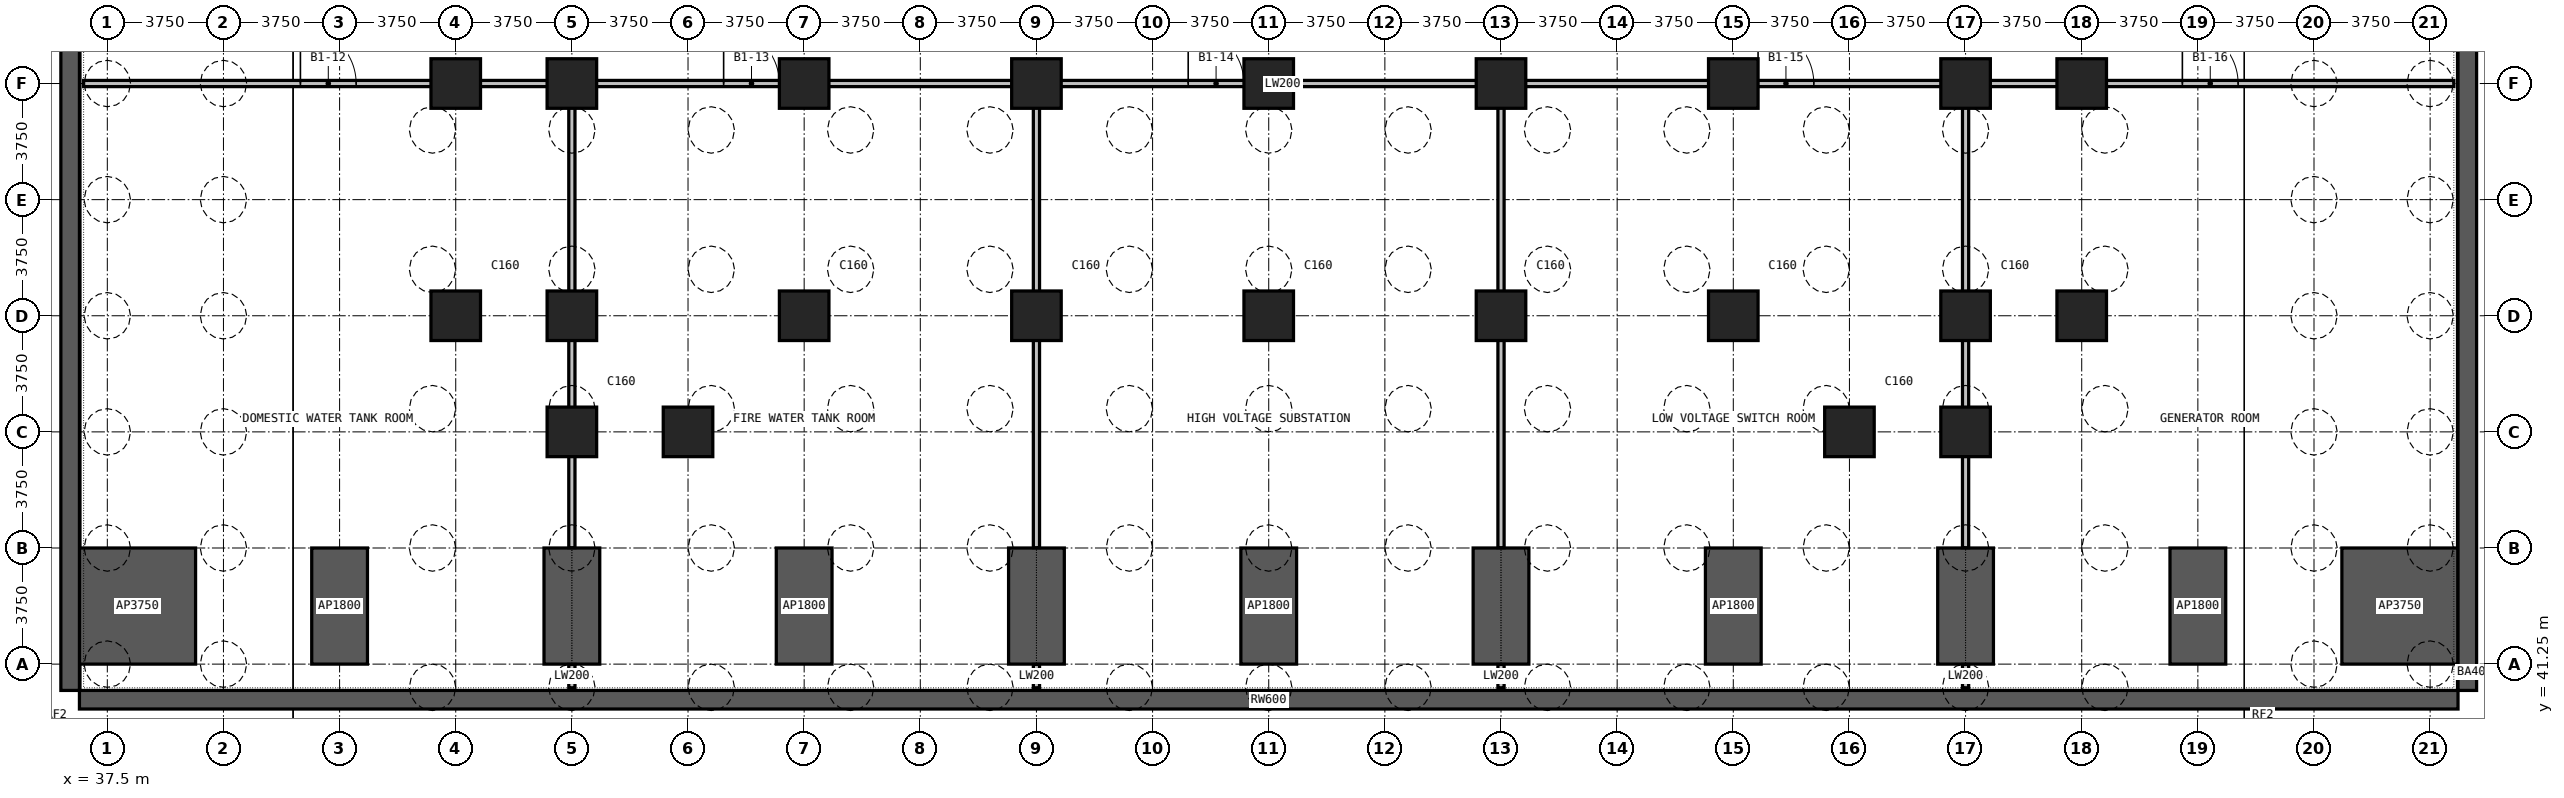
"""IFC4 building model, lengths in metres.
Left out: names, types, materials, properties, quantities, classifications, styles, units other than length and angle.
Written with IfcOpenShell. Run it as: python <this file> out.ifc"""

import sys

from ifc_helpers import new_model, si_unit, direction, frame, frame_2d, origin, origin_2d, place, context, subcontext, project, spatial, rectangle, extrude, element, fill, save


model = new_model("IFC4")
c1 = context("Model", 3, precision=1e-05, world=origin(), true_north=direction((0.0, 1.0)))
c2 = subcontext(c1, "Body", "Model", "MODEL_VIEW")
j1 = project(units=[si_unit("LENGTHUNIT", "METRE"), si_unit("PLANEANGLEUNIT", "RADIAN")], contexts=[c1])
p1 = place(None, origin())
s1 = spatial("IfcSite", under=j1, at=p1, CompositionType="ELEMENT")
p2 = place(p1, origin())
s2 = spatial("IfcBuilding", under=s1, at=p2, CompositionType="ELEMENT")
p3 = place(p2, frame((0.0, 0.0, -6.0)))
s3 = spatial("IfcBuildingStorey", under=s2, at=p3, CompositionType="ELEMENT", Elevation=-6.0)
p4 = place(p3, frame((38.475, 41.25, 0.0), z_axis=(0.0, 0.0, 1.0), x_axis=(0.0, 1.0, 0.0)))
e1 = element("IfcWall", 1, at=p4, inside=s3, PredefinedType="SHEAR", context=c2, shape_type="SweptSolid", body=[
    extrude(rectangle(XDim=3.75, YDim=3.75, at=frame_2d((1.875, 0.0))), origin(), (0.0, 0.0, 1.0), 6.0),
])
for number, where, z_axis, x_axis in (
    (2, (45.0, 41.25, 0.0), (0.0, 0.0, 1.0), (0.0, 1.0, 0.0)),
    (3, (52.5, 41.25, 0.0), (0.0, 0.0, 1.0), (0.0, 1.0, 0.0)),
    (4, (60.0, 41.25, 0.0), (0.0, 0.0, 1.0), (0.0, 1.0, 0.0)),
    (5, (67.5, 41.25, 0.0), (0.0, 0.0, 1.0), (0.0, 1.0, 0.0)),
    (6, (75.0, 41.25, 0.0), (0.0, 0.0, 1.0), (0.0, 1.0, 0.0)),
    (7, (82.5, 41.25, 0.0), (0.0, 0.0, 1.0), (0.0, 1.0, 0.0)),
    (8, (90.0, 41.25, 0.0), (0.0, 0.0, 1.0), (0.0, 1.0, 0.0)),
    (9, (97.5, 41.25, 0.0), (0.0, 0.0, 1.0), (0.0, 1.0, 0.0)),
    (10, (105.0, 41.25, 0.0), (0.0, 0.0, 1.0), (0.0, 1.0, 0.0)),
):
    element("IfcWall", number, at=place(p3, frame(where, z_axis=z_axis, x_axis=x_axis)), inside=s3, PredefinedType="SHEAR", context=c2, shape_type="SweptSolid", body=[
        extrude(rectangle(XDim=3.75, YDim=1.8, at=frame_2d((1.875, 0.0))), origin(), (0.0, 0.0, 1.0), 6.0),
    ])
p5 = place(p3, frame((111.525, 41.25, 0.0), z_axis=(0.0, 0.0, 1.0), x_axis=(0.0, 1.0, 0.0)))
e11 = element("IfcWall", 11, at=p5, inside=s3, PredefinedType="SHEAR", context=c2, shape_type="SweptSolid", body=[
    extrude(rectangle(XDim=3.75, YDim=3.75, at=frame_2d((1.875, 0.0))), origin(), (0.0, 0.0, 1.0), 6.0),
])
for number, where, z_axis, x_axis in (
    (12, (113.7, 40.4, -0.4), (0.0, 0.0, 1.0), (0.0, 1.0, 0.0)),
    (13, (36.3, 40.4, -0.4), (0.0, 0.0, 1.0), (0.0, 1.0, 0.0)),
):
    element("IfcWall", number, at=place(p3, frame(where, z_axis=z_axis, x_axis=x_axis)), inside=s3, PredefinedType="SOLIDWALL", context=c2, shape_type="SweptSolid", body=[
        extrude(rectangle(XDim=54.8, YDim=0.6, at=frame_2d((27.4, 0.0))), origin(), (0.0, 0.0, 1.0), 6.4),
    ])
p6 = place(p3, frame((36.6, 40.1, -0.4), z_axis=(0.0, 0.0, 1.0), x_axis=(1.0, 0.0, 0.0)))
e14 = element("IfcWall", 14, at=p6, inside=s3, PredefinedType="SOLIDWALL", context=c2, shape_type="SweptSolid", body=[
    extrude(rectangle(XDim=76.8, YDim=0.6, at=frame_2d((38.4, 0.0))), origin(), (0.0, 0.0, 1.0), 6.4),
])
for number, where, z_axis, x_axis in (
    (15, (48.75, 52.5, 0.0), (0.0, 0.0, 1.0), (1.0, 0.0, 0.0)),
    (16, (48.75, 60.0, 0.0), (0.0, 0.0, 1.0), (1.0, 0.0, 0.0)),
    (17, (52.5, 48.75, 0.0), (0.0, 0.0, 1.0), (1.0, 0.0, 0.0)),
    (18, (52.5, 52.5, 0.0), (0.0, 0.0, 1.0), (1.0, 0.0, 0.0)),
    (19, (52.5, 60.0, 0.0), (0.0, 0.0, 1.0), (1.0, 0.0, 0.0)),
    (20, (56.25, 48.75, 0.0), (0.0, 0.0, 1.0), (1.0, 0.0, 0.0)),
    (21, (60.0, 52.5, 0.0), (0.0, 0.0, 1.0), (1.0, 0.0, 0.0)),
    (22, (60.0, 60.0, 0.0), (0.0, 0.0, 1.0), (1.0, 0.0, 0.0)),
    (23, (67.5, 52.5, 0.0), (0.0, 0.0, 1.0), (1.0, 0.0, 0.0)),
    (24, (67.5, 60.0, 0.0), (0.0, 0.0, 1.0), (1.0, 0.0, 0.0)),
    (25, (75.0, 52.5, 0.0), (0.0, 0.0, 1.0), (1.0, 0.0, 0.0)),
    (26, (75.0, 60.0, 0.0), (0.0, 0.0, 1.0), (1.0, 0.0, 0.0)),
    (27, (82.5, 52.5, 0.0), (0.0, 0.0, 1.0), (1.0, 0.0, 0.0)),
    (28, (82.5, 60.0, 0.0), (0.0, 0.0, 1.0), (1.0, 0.0, 0.0)),
    (29, (90.0, 52.5, 0.0), (0.0, 0.0, 1.0), (1.0, 0.0, 0.0)),
    (30, (90.0, 60.0, 0.0), (0.0, 0.0, 1.0), (1.0, 0.0, 0.0)),
    (31, (93.75, 48.75, 0.0), (0.0, 0.0, 1.0), (1.0, 0.0, 0.0)),
    (32, (97.5, 48.75, 0.0), (0.0, 0.0, 1.0), (1.0, 0.0, 0.0)),
    (33, (97.5, 52.5, 0.0), (0.0, 0.0, 1.0), (1.0, 0.0, 0.0)),
    (34, (97.5, 60.0, 0.0), (0.0, 0.0, 1.0), (1.0, 0.0, 0.0)),
    (35, (101.25, 52.5, 0.0), (0.0, 0.0, 1.0), (1.0, 0.0, 0.0)),
    (36, (101.25, 60.0, 0.0), (0.0, 0.0, 1.0), (1.0, 0.0, 0.0)),
):
    element("IfcColumn", number, at=place(p3, frame(where, z_axis=z_axis, x_axis=x_axis)), inside=s3, PredefinedType="COLUMN", context=c2, shape_type="SweptSolid", body=[
        extrude(rectangle(XDim=1.6, YDim=1.6, at=origin_2d()), origin(), (0.0, 0.0, 1.0), 6.0),
    ])
p7 = place(p3, frame((36.735, 60.0, 0.0), z_axis=(0.0, 0.0, 1.0), x_axis=(1.0, 0.0, 0.0)))
e37 = element("IfcWall", 37, at=p7, inside=s3, PredefinedType="PARTITIONING", context=c2, shape_type="SweptSolid", body=[
    extrude(rectangle(XDim=76.53, YDim=0.2, at=frame_2d((38.265, 0.0))), origin(), (0.0, 0.0, 1.0), 5.65),
])
p8 = place(p7, frame((7.0, 0.0, 0.0)))
e38 = element("IfcOpeningElement", 38, at=p8, cuts=e37, PredefinedType="OPENING", context=c2, shape_type="SweptSolid", body=[
    extrude(rectangle(XDim=1.8, YDim=2.4, at=frame_2d((0.9, 1.2))), frame((0.0, 0.11, 0.0), z_axis=(0.0, -1.0, 0.0), x_axis=(1.0, 0.0, 0.0)), (0.0, 0.0, 1.0), 0.22),
])
p9 = place(p7, frame((20.665, 0.0, 0.0)))
e39 = element("IfcOpeningElement", 39, at=p9, cuts=e37, PredefinedType="OPENING", context=c2, shape_type="SweptSolid", body=[
    extrude(rectangle(XDim=1.8, YDim=2.4, at=frame_2d((0.9, 1.2))), frame((0.0, 0.11, 0.0), z_axis=(0.0, -1.0, 0.0), x_axis=(1.0, 0.0, 0.0)), (0.0, 0.0, 1.0), 0.22),
])
p10 = place(p7, frame((35.665, 0.0, 0.0)))
e40 = element("IfcOpeningElement", 40, at=p10, cuts=e37, PredefinedType="OPENING", context=c2, shape_type="SweptSolid", body=[
    extrude(rectangle(XDim=1.8, YDim=2.4, at=frame_2d((0.9, 1.2))), frame((0.0, 0.11, 0.0), z_axis=(0.0, -1.0, 0.0), x_axis=(1.0, 0.0, 0.0)), (0.0, 0.0, 1.0), 0.22),
])
p11 = place(p7, frame((54.065, 0.0, 0.0)))
e41 = element("IfcOpeningElement", 41, at=p11, cuts=e37, PredefinedType="OPENING", context=c2, shape_type="SweptSolid", body=[
    extrude(rectangle(XDim=1.8, YDim=2.4, at=frame_2d((0.9, 1.2))), frame((0.0, 0.11, 0.0), z_axis=(0.0, -1.0, 0.0), x_axis=(1.0, 0.0, 0.0)), (0.0, 0.0, 1.0), 0.22),
])
p12 = place(p7, frame((67.765, 0.0, 0.0)))
e42 = element("IfcOpeningElement", 42, at=p12, cuts=e37, PredefinedType="OPENING", context=c2, shape_type="SweptSolid", body=[
    extrude(rectangle(XDim=1.8, YDim=2.4, at=frame_2d((0.9, 1.2))), frame((0.0, 0.11, 0.0), z_axis=(0.0, -1.0, 0.0), x_axis=(1.0, 0.0, 0.0)), (0.0, 0.0, 1.0), 0.22),
])
p13 = place(p3, frame((52.5, 40.485, 0.0), z_axis=(0.0, 0.0, 1.0), x_axis=(0.0, 1.0, 0.0)))
e43 = element("IfcWall", 43, at=p13, inside=s3, PredefinedType="PARTITIONING", context=c2, shape_type="SweptSolid", body=[
    extrude(rectangle(XDim=0.755, YDim=0.2, at=frame_2d((0.377, 0.0))), origin(), (0.0, 0.0, 1.0), 5.65),
])
p14 = place(p3, frame((52.5, 45.01, 0.0), z_axis=(0.0, 0.0, 1.0), x_axis=(0.0, 1.0, 0.0)))
e44 = element("IfcWall", 44, at=p14, inside=s3, PredefinedType="PARTITIONING", context=c2, shape_type="SweptSolid", body=[
    extrude(rectangle(XDim=14.89, YDim=0.2, at=frame_2d((7.445, 0.0))), origin(), (0.0, 0.0, 1.0), 5.65),
])
p15 = place(p3, frame((67.5, 40.485, 0.0), z_axis=(0.0, 0.0, 1.0), x_axis=(0.0, 1.0, 0.0)))
e45 = element("IfcWall", 45, at=p15, inside=s3, PredefinedType="PARTITIONING", context=c2, shape_type="SweptSolid", body=[
    extrude(rectangle(XDim=0.755, YDim=0.2, at=frame_2d((0.377, 0.0))), origin(), (0.0, 0.0, 1.0), 5.65),
])
p16 = place(p3, frame((67.5, 45.01, 0.0), z_axis=(0.0, 0.0, 1.0), x_axis=(0.0, 1.0, 0.0)))
e46 = element("IfcWall", 46, at=p16, inside=s3, PredefinedType="PARTITIONING", context=c2, shape_type="SweptSolid", body=[
    extrude(rectangle(XDim=14.89, YDim=0.2, at=frame_2d((7.445, 0.0))), origin(), (0.0, 0.0, 1.0), 5.65),
])
p17 = place(p3, frame((82.5, 40.485, 0.0), z_axis=(0.0, 0.0, 1.0), x_axis=(0.0, 1.0, 0.0)))
e47 = element("IfcWall", 47, at=p17, inside=s3, PredefinedType="PARTITIONING", context=c2, shape_type="SweptSolid", body=[
    extrude(rectangle(XDim=0.755, YDim=0.2, at=frame_2d((0.377, 0.0))), origin(), (0.0, 0.0, 1.0), 5.65),
])
p18 = place(p3, frame((82.5, 45.01, 0.0), z_axis=(0.0, 0.0, 1.0), x_axis=(0.0, 1.0, 0.0)))
e48 = element("IfcWall", 48, at=p18, inside=s3, PredefinedType="PARTITIONING", context=c2, shape_type="SweptSolid", body=[
    extrude(rectangle(XDim=14.89, YDim=0.2, at=frame_2d((7.445, 0.0))), origin(), (0.0, 0.0, 1.0), 5.65),
])
p19 = place(p3, frame((97.5, 40.485, 0.0), z_axis=(0.0, 0.0, 1.0), x_axis=(0.0, 1.0, 0.0)))
e49 = element("IfcWall", 49, at=p19, inside=s3, PredefinedType="PARTITIONING", context=c2, shape_type="SweptSolid", body=[
    extrude(rectangle(XDim=0.755, YDim=0.2, at=frame_2d((0.377, 0.0))), origin(), (0.0, 0.0, 1.0), 5.65),
])
p20 = place(p3, frame((97.5, 45.01, 0.0), z_axis=(0.0, 0.0, 1.0), x_axis=(0.0, 1.0, 0.0)))
e50 = element("IfcWall", 50, at=p20, inside=s3, PredefinedType="PARTITIONING", context=c2, shape_type="SweptSolid", body=[
    extrude(rectangle(XDim=14.89, YDim=0.2, at=frame_2d((7.445, 0.0))), origin(), (0.0, 0.0, 1.0), 5.65),
])
p21 = place(p8, origin())
e51 = element("IfcDoor", 51, at=p21, inside=s3, OperationType="DOUBLE_DOOR_SINGLE_SWING", PredefinedType="DOOR", context=c2, shape_type="SweptSolid", body=[
    extrude(rectangle(XDim=1.8, YDim=2.4, at=frame_2d((0.9, 1.2))), frame((0.0, 0.025, 0.0), z_axis=(0.0, -1.0, 0.0), x_axis=(1.0, 0.0, 0.0)), (0.0, 0.0, 1.0), 0.05),
])
fill(e38, e51)
p22 = place(p9, origin())
e52 = element("IfcDoor", 52, at=p22, inside=s3, OperationType="DOUBLE_DOOR_SINGLE_SWING", PredefinedType="DOOR", context=c2, shape_type="SweptSolid", body=[
    extrude(rectangle(XDim=1.8, YDim=2.4, at=frame_2d((0.9, 1.2))), frame((0.0, 0.025, 0.0), z_axis=(0.0, -1.0, 0.0), x_axis=(1.0, 0.0, 0.0)), (0.0, 0.0, 1.0), 0.05),
])
fill(e39, e52)
p23 = place(p10, origin())
e53 = element("IfcDoor", 53, at=p23, inside=s3, OperationType="DOUBLE_DOOR_SINGLE_SWING", PredefinedType="DOOR", context=c2, shape_type="SweptSolid", body=[
    extrude(rectangle(XDim=1.8, YDim=2.4, at=frame_2d((0.9, 1.2))), frame((0.0, 0.025, 0.0), z_axis=(0.0, -1.0, 0.0), x_axis=(1.0, 0.0, 0.0)), (0.0, 0.0, 1.0), 0.05),
])
fill(e40, e53)
p24 = place(p11, origin())
e54 = element("IfcDoor", 54, at=p24, inside=s3, OperationType="DOUBLE_DOOR_SINGLE_SWING", PredefinedType="DOOR", context=c2, shape_type="SweptSolid", body=[
    extrude(rectangle(XDim=1.8, YDim=2.4, at=frame_2d((0.9, 1.2))), frame((0.0, 0.025, 0.0), z_axis=(0.0, -1.0, 0.0), x_axis=(1.0, 0.0, 0.0)), (0.0, 0.0, 1.0), 0.05),
])
fill(e41, e54)
p25 = place(p12, origin())
e55 = element("IfcDoor", 55, at=p25, inside=s3, OperationType="DOUBLE_DOOR_SINGLE_SWING", PredefinedType="DOOR", context=c2, shape_type="SweptSolid", body=[
    extrude(rectangle(XDim=1.8, YDim=2.4, at=frame_2d((0.9, 1.2))), frame((0.0, 0.025, 0.0), z_axis=(0.0, -1.0, 0.0), x_axis=(1.0, 0.0, 0.0)), (0.0, 0.0, 1.0), 0.05),
])
fill(e42, e55)
save(model, sys.argv[1])
